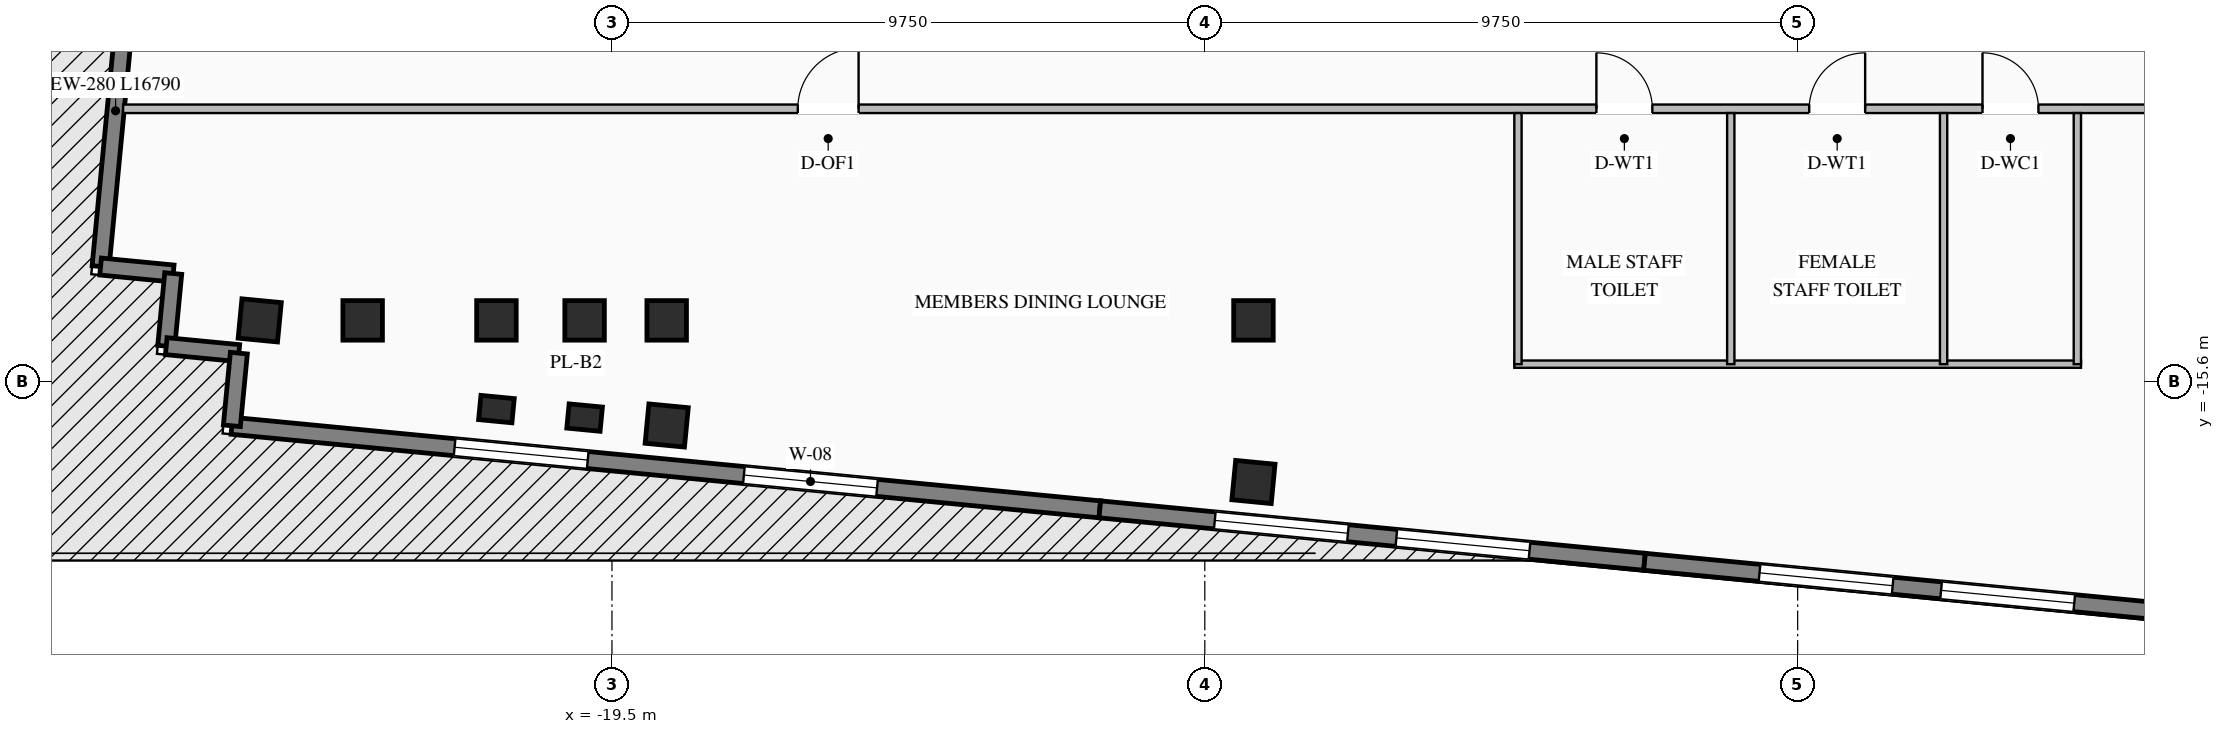
"""IFC4 building model, lengths in metres.
Left out: names, types, materials, properties, quantities, classifications, styles, units other than length and angle.
Written with IfcOpenShell. Run it as: python <this file> out.ifc"""

import sys

from ifc_helpers import new_model, si_unit, direction, frame, frame_2d, origin, origin_2d, place, context, subcontext, project, spatial, rectangle, i_section, extrude, element, fill, save


model = new_model("IFC4")
c1 = context("Model", 3, precision=1e-05, world=origin(), true_north=direction((0.0, 1.0)))
c2 = subcontext(c1, "Body", "Model", "MODEL_VIEW")
j1 = project(units=[si_unit("LENGTHUNIT", "METRE"), si_unit("PLANEANGLEUNIT", "RADIAN")], contexts=[c1])
p1 = place(None, origin())
s1 = spatial("IfcSite", under=j1, at=p1, CompositionType="ELEMENT")
p2 = place(p1, origin())
s2 = spatial("IfcBuilding", under=s1, at=p2, CompositionType="ELEMENT")
p3 = place(p2, frame((0.0, 0.0, 156.2)))
s3 = spatial("IfcBuildingStorey", under=s2, at=p3, CompositionType="ELEMENT", Elevation=156.2)
for number, where, z_axis, x_axis in (
    (1, (-21.4, -14.6, 0.0), (0.0, 0.0, 1.0), (1.0, 0.0, 0.0)),
    (2, (-19.95, -14.6, 0.0), (0.0, 0.0, 1.0), (1.0, 0.0, 0.0)),
    (3, (-18.6, -14.6, 0.0), (0.0, 0.0, 1.0), (1.0, 0.0, 0.0)),
    (4, (-8.95, -14.6, 0.0), (0.0, 0.0, 1.0), (1.0, 0.0, 0.0)),
    (5, (-23.6, -14.6, 0.0), (0.0, 0.0, 1.0), (1.0, 0.0, 0.0)),
):
    element("IfcColumn", number, at=place(p3, frame(where, z_axis=z_axis, x_axis=x_axis)), inside=s3, PredefinedType="COLUMN", context=c2, shape_type="SweptSolid", body=[
        extrude(i_section(OverallWidth=0.65, OverallDepth=0.65, WebThickness=0.028, FlangeThickness=0.04, at=origin_2d()), origin(), (0.0, 0.0, 1.0), 4.2),
    ])
p4 = place(p3, frame((-18.6, -16.329, -0.28), z_axis=(0.0, 0.0, 1.0), x_axis=(0.995396198367, -0.09584575252, 0.0)))
e6 = element("IfcColumn", 6, at=p4, inside=s3, PredefinedType="COLUMN", context=c2, shape_type="SweptSolid", body=[
    extrude(i_section(OverallWidth=0.65, OverallDepth=0.65, WebThickness=0.028, FlangeThickness=0.04, at=origin_2d()), origin(), (0.0, 0.0, 1.0), 4.48),
])
p5 = place(p3, frame((-8.95, -17.258, 0.0), z_axis=(0.0, 0.0, 1.0), x_axis=(0.995396198367, -0.09584575252, 0.0)))
e7 = element("IfcColumn", 7, at=p5, inside=s3, PredefinedType="COLUMN", context=c2, shape_type="SweptSolid", body=[
    extrude(i_section(OverallWidth=0.65, OverallDepth=0.65, WebThickness=0.028, FlangeThickness=0.04, at=origin_2d()), origin(), (0.0, 0.0, 1.0), 4.2),
])
p6 = place(p3, frame((-25.293, -14.6, -0.28), z_axis=(0.0, 0.0, 1.0), x_axis=(0.995396198367, -0.09584575252, 0.0)))
e8 = element("IfcColumn", 8, at=p6, inside=s3, PredefinedType="COLUMN", context=c2, shape_type="SweptSolid", body=[
    extrude(i_section(OverallWidth=0.65, OverallDepth=0.65, WebThickness=0.028, FlangeThickness=0.04, at=origin_2d()), origin(), (0.0, 0.0, 1.0), 4.48),
])
for number, where, z_axis, x_axis in (
    (9, (-21.4, -16.059, -0.28), (0.0, 0.0, 1.0), (0.995, -0.096, 0.0)),
    (10, (-19.95, -16.199, -0.28), (0.0, 0.0, 1.0), (0.995, -0.096, 0.0)),
):
    element("IfcColumn", number, at=place(p3, frame(where, z_axis=z_axis, x_axis=x_axis)), inside=s3, PredefinedType="PILASTER", context=c2, shape_type="SweptSolid", body=[
        extrude(rectangle(XDim=0.55, YDim=0.4, at=origin_2d()), origin(), (0.0, 0.0, 1.0), 4.48),
    ])
p7 = place(p3, frame((-11.477, -17.708, 0.0), z_axis=(0.0, 0.0, 1.0), x_axis=(-0.995395762701, 0.095850276977, 0.0)))
e11 = element("IfcWall", 11, at=p7, inside=s3, PredefinedType="STANDARD", context=c2, shape_type="SweptSolid", body=[
    extrude(rectangle(XDim=14.34, YDim=0.28, at=frame_2d((7.17, 0.0))), origin(), (0.0, 0.0, 1.0), 4.0),
])
p8 = place(p7, frame((3.68, 0.0, 0.76)))
e12 = element("IfcOpeningElement", 12, at=p8, cuts=e11, PredefinedType="OPENING", context=c2, shape_type="SweptSolid", body=[
    extrude(rectangle(XDim=2.2, YDim=2.25, at=frame_2d((1.1, 1.125))), frame((0.0, 0.15, 0.0), z_axis=(0.0, -1.0, 0.0), x_axis=(1.0, 0.0, 0.0)), (0.0, 0.0, 1.0), 0.3),
])
p9 = place(p7, frame((8.46, 0.0, 0.76)))
e13 = element("IfcOpeningElement", 13, at=p9, cuts=e11, PredefinedType="OPENING", context=c2, shape_type="SweptSolid", body=[
    extrude(rectangle(XDim=2.2, YDim=2.25, at=frame_2d((1.1, 1.125))), frame((0.0, 0.15, 0.0), z_axis=(0.0, -1.0, 0.0), x_axis=(1.0, 0.0, 0.0)), (0.0, 0.0, 1.0), 0.3),
])
p10 = place(p3, frame((-2.519, -18.57, 0.0), z_axis=(0.0, 0.0, 1.0), x_axis=(-0.995396794462, 0.09583956164, 0.0)))
e14 = element("IfcWall", 14, at=p10, inside=s3, PredefinedType="STANDARD", context=c2, shape_type="SweptSolid", body=[
    extrude(rectangle(XDim=9.0, YDim=0.28, at=frame_2d((4.5, 0.0))), origin(), (0.0, 0.0, 1.0), 4.0),
])
p11 = place(p10, frame((1.9, 0.0, 0.76)))
e15 = element("IfcOpeningElement", 15, at=p11, cuts=e14, PredefinedType="OPENING", context=c2, shape_type="SweptSolid", body=[
    extrude(rectangle(XDim=2.2, YDim=2.25, at=frame_2d((1.1, 1.125))), frame((0.0, 0.15, 0.0), z_axis=(0.0, -1.0, 0.0), x_axis=(1.0, 0.0, 0.0)), (0.0, 0.0, 1.0), 0.3),
])
p12 = place(p10, frame((4.9, 0.0, 0.76)))
e16 = element("IfcOpeningElement", 16, at=p12, cuts=e14, PredefinedType="OPENING", context=c2, shape_type="SweptSolid", body=[
    extrude(rectangle(XDim=2.2, YDim=2.25, at=frame_2d((1.1, 1.125))), frame((0.0, 0.15, 0.0), z_axis=(0.0, -1.0, 0.0), x_axis=(1.0, 0.0, 0.0)), (0.0, 0.0, 1.0), 0.3),
])
p13 = place(p3, frame((6.44, -19.433, 0.0), z_axis=(0.0, 0.0, 1.0), x_axis=(-0.995396794462, 0.09583956164, 0.0)))
e17 = element("IfcWall", 17, at=p13, inside=s3, PredefinedType="STANDARD", context=c2, shape_type="SweptSolid", body=[
    extrude(rectangle(XDim=9.0, YDim=0.28, at=frame_2d((4.5, 0.0))), origin(), (0.0, 0.0, 1.0), 4.0),
])
p14 = place(p13, frame((1.9, 0.0, 0.76)))
e18 = element("IfcOpeningElement", 18, at=p14, cuts=e17, PredefinedType="OPENING", context=c2, shape_type="SweptSolid", body=[
    extrude(rectangle(XDim=2.2, YDim=2.25, at=frame_2d((1.1, 1.125))), frame((0.0, 0.15, 0.0), z_axis=(0.0, -1.0, 0.0), x_axis=(1.0, 0.0, 0.0)), (0.0, 0.0, 1.0), 0.3),
])
p15 = place(p13, frame((4.9, 0.0, 0.76)))
e19 = element("IfcOpeningElement", 19, at=p15, cuts=e17, PredefinedType="OPENING", context=c2, shape_type="SweptSolid", body=[
    extrude(rectangle(XDim=2.2, YDim=2.25, at=frame_2d((1.1, 1.125))), frame((0.0, 0.15, 0.0), z_axis=(0.0, -1.0, 0.0), x_axis=(1.0, 0.0, 0.0)), (0.0, 0.0, 1.0), 0.3),
])
p16 = place(p3, frame((-27.91, -13.714, 0.0), z_axis=(0.0, 0.0, 1.0), x_axis=(0.095839027265, 0.995396845913, 0.0)))
e20 = element("IfcWall", 20, at=p16, inside=s3, PredefinedType="STANDARD", context=c2, shape_type="SweptSolid", body=[
    extrude(rectangle(XDim=16.79, YDim=0.28, at=frame_2d((8.395, 0.0))), origin(), (0.0, 0.0, 1.0), 4.0),
])
p17 = place(p16, frame((5.147, 0.0, 0.76)))
e21 = element("IfcOpeningElement", 21, at=p17, cuts=e20, PredefinedType="OPENING", context=c2, shape_type="SweptSolid", body=[
    extrude(rectangle(XDim=2.0, YDim=2.05, at=frame_2d((1.0, 1.025))), frame((0.0, 0.15, 0.0), z_axis=(0.0, -1.0, 0.0), x_axis=(1.0, 0.0, 0.0)), (0.0, 0.0, 1.0), 0.3),
])
p18 = place(p16, frame((10.193, 0.0, 0.76)))
e22 = element("IfcOpeningElement", 22, at=p18, cuts=e20, PredefinedType="OPENING", context=c2, shape_type="SweptSolid", body=[
    extrude(rectangle(XDim=2.0, YDim=2.05, at=frame_2d((1.0, 1.025))), frame((0.0, 0.15, 0.0), z_axis=(0.0, -1.0, 0.0), x_axis=(1.0, 0.0, 0.0)), (0.0, 0.0, 1.0), 0.3),
])
p19 = place(p3, frame((-27.91, -13.714, 0.0), z_axis=(0.0, 0.0, 1.0), x_axis=(0.995397091755, -0.095836473879, 0.0)))
e23 = element("IfcWall", 23, at=p19, inside=s3, PredefinedType="STANDARD", context=c2, shape_type="SweptSolid", body=[
    extrude(rectangle(XDim=1.2, YDim=0.28, at=frame_2d((0.6, 0.0))), origin(), (0.0, 0.0, 1.0), 4.0),
])
for number, where, z_axis, x_axis in (
    (24, (-26.716, -13.829, 0.0), (0.0, 0.0, 1.0), (-0.096, -0.995, 0.0)),
    (25, (-26.831, -15.024, 0.0), (0.0, 0.0, 1.0), (0.995, -0.096, 0.0)),
):
    element("IfcWall", number, at=place(p3, frame(where, z_axis=z_axis, x_axis=x_axis)), inside=s3, PredefinedType="STANDARD", context=c2, shape_type="SweptSolid", body=[
        extrude(rectangle(XDim=1.2, YDim=0.28, at=frame_2d((0.6, 0.0))), origin(), (0.0, 0.0, 1.0), 4.0),
    ])
p20 = place(p3, frame((-25.636, -15.139, 0.0), z_axis=(0.0, 0.0, 1.0), x_axis=(-0.096038073607, -0.995377661201, 0.0)))
e26 = element("IfcWall", 26, at=p20, inside=s3, PredefinedType="STANDARD", context=c2, shape_type="SweptSolid", body=[
    extrude(rectangle(XDim=1.2, YDim=0.28, at=frame_2d((0.6, 0.0))), origin(), (0.0, 0.0, 1.0), 4.0),
])
p21 = place(p3, frame((-27.54, -11.12, 0.0), z_axis=(0.0, 0.0, 1.0), x_axis=(1.0, 0.0, 0.0)))
e27 = element("IfcWall", 27, at=p21, inside=s3, PredefinedType="STANDARD", context=c2, shape_type="SweptSolid", body=[
    extrude(rectangle(XDim=60.519, YDim=0.14, at=frame_2d((30.259, 0.0))), origin(), (0.0, 0.0, 1.0), 4.0),
])
p22 = place(p21, frame((24.23, 0.0, 0.0)))
e28 = element("IfcOpeningElement", 28, at=p22, cuts=e27, PredefinedType="OPENING", context=c2, shape_type="SweptSolid", body=[
    extrude(rectangle(XDim=0.92, YDim=2.08, at=frame_2d((0.46, 1.04))), frame((0.0, 0.08, 0.0), z_axis=(0.0, -1.0, 0.0), x_axis=(1.0, 0.0, 0.0)), (0.0, 0.0, 1.0), 0.16),
])
p23 = place(p21, frame((27.73, 0.0, 0.0)))
e29 = element("IfcOpeningElement", 29, at=p23, cuts=e27, PredefinedType="OPENING", context=c2, shape_type="SweptSolid", body=[
    extrude(rectangle(XDim=0.92, YDim=2.08, at=frame_2d((0.46, 1.04))), frame((0.0, 0.08, 0.0), z_axis=(0.0, -1.0, 0.0), x_axis=(1.0, 0.0, 0.0)), (0.0, 0.0, 1.0), 0.16),
])
p24 = place(p21, frame((30.58, 0.0, 0.0)))
e30 = element("IfcOpeningElement", 30, at=p24, cuts=e27, PredefinedType="OPENING", context=c2, shape_type="SweptSolid", body=[
    extrude(rectangle(XDim=0.92, YDim=2.08, at=frame_2d((0.46, 1.04))), frame((0.0, 0.08, 0.0), z_axis=(0.0, -1.0, 0.0), x_axis=(1.0, 0.0, 0.0)), (0.0, 0.0, 1.0), 0.16),
])
p25 = place(p21, frame((11.096, 0.0, 0.0)))
e31 = element("IfcOpeningElement", 31, at=p25, cuts=e27, PredefinedType="OPENING", context=c2, shape_type="SweptSolid", body=[
    extrude(rectangle(XDim=1.0, YDim=2.08, at=frame_2d((0.5, 1.04))), frame((0.0, 0.08, 0.0), z_axis=(0.0, -1.0, 0.0), x_axis=(1.0, 0.0, 0.0)), (0.0, 0.0, 1.0), 0.16),
])
p26 = place(p21, frame((45.703, 0.0, 0.0)))
e32 = element("IfcOpeningElement", 32, at=p26, cuts=e27, PredefinedType="OPENING", context=c2, shape_type="SweptSolid", body=[
    extrude(rectangle(XDim=1.0, YDim=2.08, at=frame_2d((0.5, 1.04))), frame((0.0, 0.08, 0.0), z_axis=(0.0, -1.0, 0.0), x_axis=(1.0, 0.0, 0.0)), (0.0, 0.0, 1.0), 0.16),
])
p27 = place(p3, frame((-4.66, -15.32, 0.0), z_axis=(0.0, 0.0, 1.0), x_axis=(1.0, 0.0, 0.0)))
e33 = element("IfcWall", 33, at=p27, inside=s3, PredefinedType="STANDARD", context=c2, shape_type="SweptSolid", body=[
    extrude(rectangle(XDim=9.32, YDim=0.12, at=frame_2d((4.66, 0.0))), origin(), (0.0, 0.0, 1.0), 4.0),
])
for number, where, z_axis, x_axis in (
    (34, (-4.6, -15.32, 0.0), (0.0, 0.0, 1.0), (0.0, 1.0, 0.0)),
    (35, (-1.1, -15.32, 0.0), (0.0, 0.0, 1.0), (0.0, 1.0, 0.0)),
    (36, (2.4, -15.32, 0.0), (0.0, 0.0, 1.0), (0.0, 1.0, 0.0)),
    (37, (4.6, -15.32, 0.0), (0.0, 0.0, 1.0), (0.0, 1.0, 0.0)),
):
    element("IfcWall", number, at=place(p3, frame(where, z_axis=z_axis, x_axis=x_axis)), inside=s3, PredefinedType="STANDARD", context=c2, shape_type="SweptSolid", body=[
        extrude(rectangle(XDim=4.13, YDim=0.12, at=frame_2d((2.065, 0.0))), origin(), (0.0, 0.0, 1.0), 4.0),
    ])
p28 = place(p8, origin())
e38 = element("IfcWindow", 38, at=p28, inside=s3, PartitioningType="DOUBLE_PANEL_VERTICAL", PredefinedType="WINDOW", context=c2, shape_type="SweptSolid", body=[
    extrude(rectangle(XDim=2.2, YDim=2.25, at=frame_2d((1.1, 1.125))), frame((0.0, 0.03, 0.0), z_axis=(0.0, -1.0, 0.0), x_axis=(1.0, 0.0, 0.0)), (0.0, 0.0, 1.0), 0.06),
])
fill(e12, e38)
p29 = place(p9, origin())
e39 = element("IfcWindow", 39, at=p29, inside=s3, PartitioningType="DOUBLE_PANEL_VERTICAL", PredefinedType="WINDOW", context=c2, shape_type="SweptSolid", body=[
    extrude(rectangle(XDim=2.2, YDim=2.25, at=frame_2d((1.1, 1.125))), frame((0.0, 0.03, 0.0), z_axis=(0.0, -1.0, 0.0), x_axis=(1.0, 0.0, 0.0)), (0.0, 0.0, 1.0), 0.06),
])
fill(e13, e39)
p30 = place(p11, origin())
e40 = element("IfcWindow", 40, at=p30, inside=s3, PartitioningType="DOUBLE_PANEL_VERTICAL", PredefinedType="WINDOW", context=c2, shape_type="SweptSolid", body=[
    extrude(rectangle(XDim=2.2, YDim=2.25, at=frame_2d((1.1, 1.125))), frame((0.0, 0.03, 0.0), z_axis=(0.0, -1.0, 0.0), x_axis=(1.0, 0.0, 0.0)), (0.0, 0.0, 1.0), 0.06),
])
fill(e15, e40)
p31 = place(p12, origin())
e41 = element("IfcWindow", 41, at=p31, inside=s3, PartitioningType="DOUBLE_PANEL_VERTICAL", PredefinedType="WINDOW", context=c2, shape_type="SweptSolid", body=[
    extrude(rectangle(XDim=2.2, YDim=2.25, at=frame_2d((1.1, 1.125))), frame((0.0, 0.03, 0.0), z_axis=(0.0, -1.0, 0.0), x_axis=(1.0, 0.0, 0.0)), (0.0, 0.0, 1.0), 0.06),
])
fill(e16, e41)
p32 = place(p14, origin())
e42 = element("IfcWindow", 42, at=p32, inside=s3, PartitioningType="DOUBLE_PANEL_VERTICAL", PredefinedType="WINDOW", context=c2, shape_type="SweptSolid", body=[
    extrude(rectangle(XDim=2.2, YDim=2.25, at=frame_2d((1.1, 1.125))), frame((0.0, 0.03, 0.0), z_axis=(0.0, -1.0, 0.0), x_axis=(1.0, 0.0, 0.0)), (0.0, 0.0, 1.0), 0.06),
])
fill(e18, e42)
p33 = place(p15, origin())
e43 = element("IfcWindow", 43, at=p33, inside=s3, PartitioningType="DOUBLE_PANEL_VERTICAL", PredefinedType="WINDOW", context=c2, shape_type="SweptSolid", body=[
    extrude(rectangle(XDim=2.2, YDim=2.25, at=frame_2d((1.1, 1.125))), frame((0.0, 0.03, 0.0), z_axis=(0.0, -1.0, 0.0), x_axis=(1.0, 0.0, 0.0)), (0.0, 0.0, 1.0), 0.06),
])
fill(e19, e43)
p34 = place(p22, origin())
e44 = element("IfcDoor", 44, at=p34, inside=s3, OperationType="SINGLE_SWING_LEFT", PredefinedType="DOOR", context=c2, shape_type="SweptSolid", body=[
    extrude(rectangle(XDim=0.92, YDim=2.08, at=frame_2d((0.46, 1.04))), frame((0.0, 0.025, 0.0), z_axis=(0.0, -1.0, 0.0), x_axis=(1.0, 0.0, 0.0)), (0.0, 0.0, 1.0), 0.05),
])
fill(e28, e44)
p35 = place(p23, origin())
e45 = element("IfcDoor", 45, at=p35, inside=s3, OperationType="SINGLE_SWING_RIGHT", PredefinedType="DOOR", context=c2, shape_type="SweptSolid", body=[
    extrude(rectangle(XDim=0.92, YDim=2.08, at=frame_2d((0.46, 1.04))), frame((0.0, 0.025, 0.0), z_axis=(0.0, -1.0, 0.0), x_axis=(1.0, 0.0, 0.0)), (0.0, 0.0, 1.0), 0.05),
])
fill(e29, e45)
p36 = place(p24, origin())
e46 = element("IfcDoor", 46, at=p36, inside=s3, OperationType="SINGLE_SWING_LEFT", PredefinedType="DOOR", context=c2, shape_type="SweptSolid", body=[
    extrude(rectangle(XDim=0.92, YDim=2.08, at=frame_2d((0.46, 1.04))), frame((0.0, 0.025, 0.0), z_axis=(0.0, -1.0, 0.0), x_axis=(1.0, 0.0, 0.0)), (0.0, 0.0, 1.0), 0.05),
])
fill(e30, e46)
p37 = place(p25, origin())
e47 = element("IfcDoor", 47, at=p37, inside=s3, OperationType="SINGLE_SWING_RIGHT", PredefinedType="DOOR", context=c2, shape_type="SweptSolid", body=[
    extrude(rectangle(XDim=1.0, YDim=2.08, at=frame_2d((0.5, 1.04))), frame((0.0, 0.025, 0.0), z_axis=(0.0, -1.0, 0.0), x_axis=(1.0, 0.0, 0.0)), (0.0, 0.0, 1.0), 0.05),
])
fill(e31, e47)
save(model, sys.argv[1])
